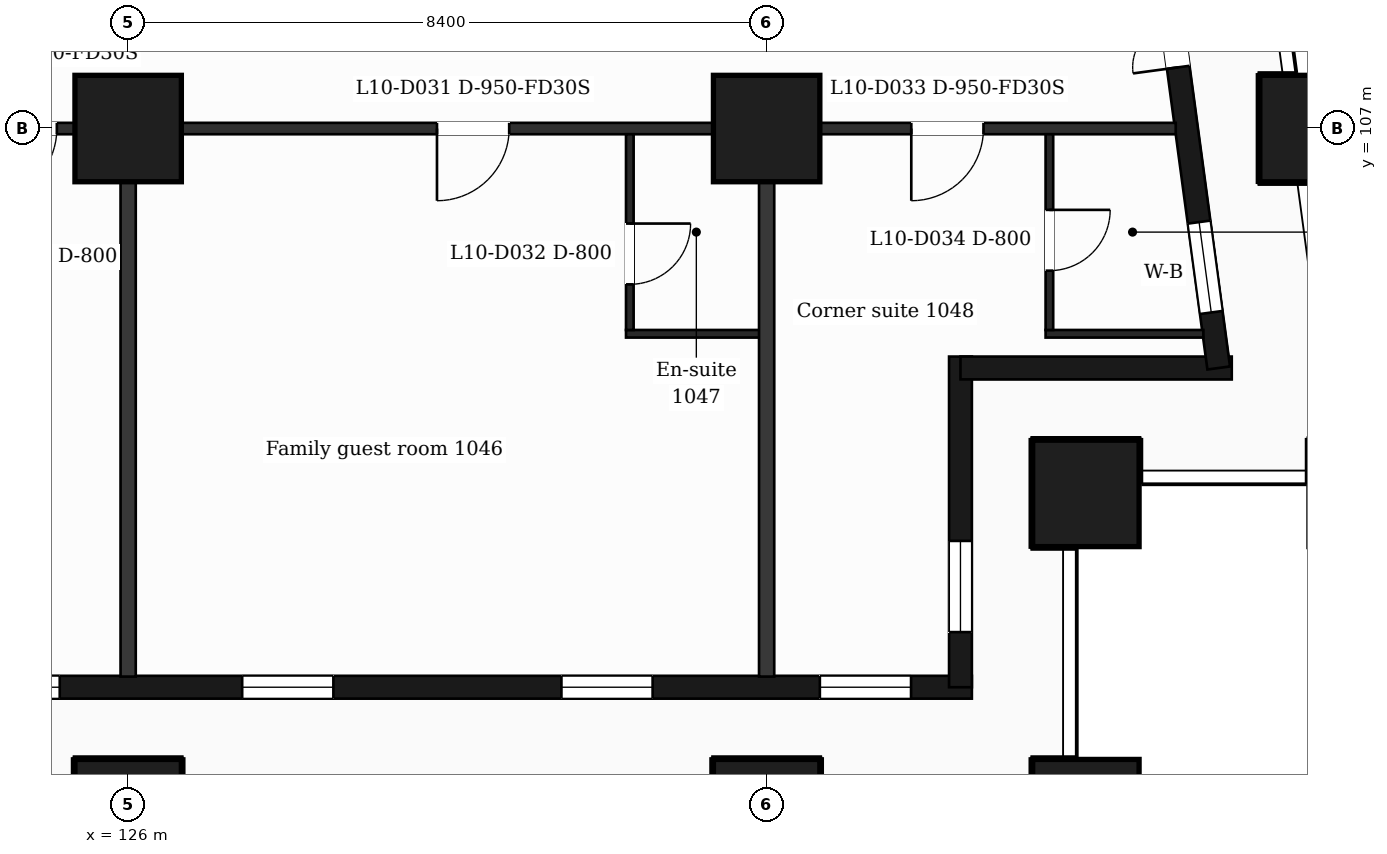
"""IFC4 building model, lengths in metres.
Left out: names, types, materials, properties, quantities, classifications, styles, units other than length and angle.
Written with IfcOpenShell. Run it as: python <this file> out.ifc"""

import sys

from ifc_helpers import new_model, si_unit, direction, frame, frame_2d, origin, origin_2d, place, context, subcontext, project, spatial, rectangle, extrude, element, fill, save


model = new_model("IFC4")
c1 = context("Model", 3, precision=1e-05, world=origin(), true_north=direction((0.0, 1.0)))
c2 = subcontext(c1, "Body", "Model", "MODEL_VIEW")
j1 = project(units=[si_unit("LENGTHUNIT", "METRE"), si_unit("PLANEANGLEUNIT", "RADIAN")], contexts=[c1])
p1 = place(None, origin())
s1 = spatial("IfcSite", under=j1, at=p1, CompositionType="ELEMENT")
p2 = place(p1, origin())
s2 = spatial("IfcBuilding", under=s1, at=p2, CompositionType="ELEMENT")
p3 = place(p2, frame((0.0, 0.0, 53.0)))
s3 = spatial("IfcBuildingStorey", under=s2, at=p3, CompositionType="ELEMENT", Elevation=53.0)
for number, where, z_axis, x_axis in (
    (1, (126.0, 98.0, 0.0), (0.0, 0.0, 1.0), (1.0, 0.0, 0.0)),
    (2, (134.4, 98.0, 0.0), (0.0, 0.0, 1.0), (1.0, 0.0, 0.0)),
    (3, (138.6, 98.0, 0.0), (0.0, 0.0, 1.0), (1.0, 0.0, 0.0)),
    (4, (138.6, 102.2, 0.0), (0.0, 0.0, 1.0), (1.0, 0.0, 0.0)),
    (5, (126.0, 107.0, 0.0), (0.0, 0.0, 1.0), (1.0, 0.0, 0.0)),
    (6, (134.4, 107.0, 0.0), (0.0, 0.0, 1.0), (1.0, 0.0, 0.0)),
    (7, (141.588, 107.0, 0.0), (0.0, 0.0, 1.0), (1.0, 0.0, 0.0)),
):
    element("IfcColumn", number, at=place(p3, frame(where, z_axis=z_axis, x_axis=x_axis)), inside=s3, PredefinedType="COLUMN", context=c2, shape_type="SweptSolid", body=[
        extrude(rectangle(XDim=1.4, YDim=1.4, at=origin_2d()), origin(), (0.0, 0.0, 1.0), 3.5),
    ])
p4 = place(p3, frame((89.85, 99.65, 0.0), z_axis=(0.0, 0.0, 1.0), x_axis=(1.0, 0.0, 0.0)))
e8 = element("IfcWall", 8, at=p4, inside=s3, PredefinedType="SOLIDWALL", context=c2, shape_type="SweptSolid", body=[
    extrude(rectangle(XDim=47.25, YDim=0.3, at=frame_2d((23.625, 0.0))), origin(), (0.0, 0.0, 1.0), 3.18),
])
p5 = place(p4, frame((0.725, 0.0, 0.9)))
e9 = element("IfcOpeningElement", 9, at=p5, cuts=e8, PredefinedType="OPENING", context=c2, shape_type="SweptSolid", body=[
    extrude(rectangle(XDim=1.2, YDim=2.1, at=frame_2d((0.6, 1.05))), frame((0.0, 0.16, 0.0), z_axis=(0.0, -1.0, 0.0), x_axis=(1.0, 0.0, 0.0)), (0.0, 0.0, 1.0), 0.32),
])
p6 = place(p4, frame((3.45, 0.0, 0.9)))
e10 = element("IfcOpeningElement", 10, at=p6, cuts=e8, PredefinedType="OPENING", context=c2, shape_type="SweptSolid", body=[
    extrude(rectangle(XDim=2.4, YDim=2.1, at=frame_2d((1.2, 1.05))), frame((0.0, 0.16, 0.0), z_axis=(0.0, -1.0, 0.0), x_axis=(1.0, 0.0, 0.0)), (0.0, 0.0, 1.0), 0.32),
])
p7 = place(p4, frame((8.25, 0.0, 0.9)))
e11 = element("IfcOpeningElement", 11, at=p7, cuts=e8, PredefinedType="OPENING", context=c2, shape_type="SweptSolid", body=[
    extrude(rectangle(XDim=1.2, YDim=2.1, at=frame_2d((0.6, 1.05))), frame((0.0, 0.16, 0.0), z_axis=(0.0, -1.0, 0.0), x_axis=(1.0, 0.0, 0.0)), (0.0, 0.0, 1.0), 0.32),
])
p8 = place(p4, frame((12.45, 0.0, 0.9)))
e12 = element("IfcOpeningElement", 12, at=p8, cuts=e8, PredefinedType="OPENING", context=c2, shape_type="SweptSolid", body=[
    extrude(rectangle(XDim=1.2, YDim=2.1, at=frame_2d((0.6, 1.05))), frame((0.0, 0.16, 0.0), z_axis=(0.0, -1.0, 0.0), x_axis=(1.0, 0.0, 0.0)), (0.0, 0.0, 1.0), 0.32),
])
p9 = place(p4, frame((16.05, 0.0, 0.9)))
e13 = element("IfcOpeningElement", 13, at=p9, cuts=e8, PredefinedType="OPENING", context=c2, shape_type="SweptSolid", body=[
    extrude(rectangle(XDim=2.4, YDim=2.1, at=frame_2d((1.2, 1.05))), frame((0.0, 0.16, 0.0), z_axis=(0.0, -1.0, 0.0), x_axis=(1.0, 0.0, 0.0)), (0.0, 0.0, 1.0), 0.32),
])
p10 = place(p4, frame((20.25, 0.0, 0.9)))
e14 = element("IfcOpeningElement", 14, at=p10, cuts=e8, PredefinedType="OPENING", context=c2, shape_type="SweptSolid", body=[
    extrude(rectangle(XDim=2.4, YDim=2.1, at=frame_2d((1.2, 1.05))), frame((0.0, 0.16, 0.0), z_axis=(0.0, -1.0, 0.0), x_axis=(1.0, 0.0, 0.0)), (0.0, 0.0, 1.0), 0.32),
])
p11 = place(p4, frame((25.05, 0.0, 0.0)))
e15 = element("IfcOpeningElement", 15, at=p11, cuts=e8, PredefinedType="OPENING", context=c2, shape_type="SweptSolid", body=[
    extrude(rectangle(XDim=1.2, YDim=2.4, at=frame_2d((0.6, 1.2))), frame((0.0, 0.16, 0.0), z_axis=(0.0, -1.0, 0.0), x_axis=(1.0, 0.0, 0.0)), (0.0, 0.0, 1.0), 0.32),
])
p12 = place(p4, frame((28.65, 0.0, 0.9)))
e16 = element("IfcOpeningElement", 16, at=p12, cuts=e8, PredefinedType="OPENING", context=c2, shape_type="SweptSolid", body=[
    extrude(rectangle(XDim=2.4, YDim=2.1, at=frame_2d((1.2, 1.05))), frame((0.0, 0.16, 0.0), z_axis=(0.0, -1.0, 0.0), x_axis=(1.0, 0.0, 0.0)), (0.0, 0.0, 1.0), 0.32),
])
p13 = place(p4, frame((32.85, 0.0, 0.9)))
e17 = element("IfcOpeningElement", 17, at=p13, cuts=e8, PredefinedType="OPENING", context=c2, shape_type="SweptSolid", body=[
    extrude(rectangle(XDim=2.4, YDim=2.1, at=frame_2d((1.2, 1.05))), frame((0.0, 0.16, 0.0), z_axis=(0.0, -1.0, 0.0), x_axis=(1.0, 0.0, 0.0)), (0.0, 0.0, 1.0), 0.32),
])
p14 = place(p4, frame((37.65, 0.0, 0.9)))
e18 = element("IfcOpeningElement", 18, at=p14, cuts=e8, PredefinedType="OPENING", context=c2, shape_type="SweptSolid", body=[
    extrude(rectangle(XDim=1.2, YDim=2.1, at=frame_2d((0.6, 1.05))), frame((0.0, 0.16, 0.0), z_axis=(0.0, -1.0, 0.0), x_axis=(1.0, 0.0, 0.0)), (0.0, 0.0, 1.0), 0.32),
])
p15 = place(p4, frame((41.85, 0.0, 0.9)))
e19 = element("IfcOpeningElement", 19, at=p15, cuts=e8, PredefinedType="OPENING", context=c2, shape_type="SweptSolid", body=[
    extrude(rectangle(XDim=1.2, YDim=2.1, at=frame_2d((0.6, 1.05))), frame((0.0, 0.16, 0.0), z_axis=(0.0, -1.0, 0.0), x_axis=(1.0, 0.0, 0.0)), (0.0, 0.0, 1.0), 0.32),
])
p16 = place(p4, frame((45.25, 0.0, 0.9)))
e20 = element("IfcOpeningElement", 20, at=p16, cuts=e8, PredefinedType="OPENING", context=c2, shape_type="SweptSolid", body=[
    extrude(rectangle(XDim=1.2, YDim=2.1, at=frame_2d((0.6, 1.05))), frame((0.0, 0.16, 0.0), z_axis=(0.0, -1.0, 0.0), x_axis=(1.0, 0.0, 0.0)), (0.0, 0.0, 1.0), 0.32),
])
p17 = place(p3, frame((136.95, 99.65, 0.0), z_axis=(0.0, 0.0, 1.0), x_axis=(0.0, 1.0, 0.0)))
e21 = element("IfcWall", 21, at=p17, inside=s3, PredefinedType="SOLIDWALL", context=c2, shape_type="SweptSolid", body=[
    extrude(rectangle(XDim=4.35, YDim=0.3, at=frame_2d((2.175, 0.0))), origin(), (0.0, 0.0, 1.0), 3.18),
])
p18 = place(p17, frame((0.725, 0.0, 0.9)))
e22 = element("IfcOpeningElement", 22, at=p18, cuts=e21, PredefinedType="OPENING", context=c2, shape_type="SweptSolid", body=[
    extrude(rectangle(XDim=1.2, YDim=2.1, at=frame_2d((0.6, 1.05))), frame((0.0, 0.16, 0.0), z_axis=(0.0, -1.0, 0.0), x_axis=(1.0, 0.0, 0.0)), (0.0, 0.0, 1.0), 0.32),
])
p19 = place(p3, frame((136.95, 103.85, 0.0), z_axis=(0.0, 0.0, 1.0), x_axis=(1.0, 0.0, 0.0)))
e23 = element("IfcWall", 23, at=p19, inside=s3, PredefinedType="SOLIDWALL", context=c2, shape_type="SweptSolid", body=[
    extrude(rectangle(XDim=3.569, YDim=0.3, at=frame_2d((1.785, 0.0))), origin(), (0.0, 0.0, 1.0), 3.18),
])
p20 = place(p3, frame((140.348, 103.85, 0.0), z_axis=(0.0, 0.0, 1.0), x_axis=(-0.133431549479, 0.991058031401, 0.0)))
e24 = element("IfcWall", 24, at=p20, inside=s3, PredefinedType="SOLIDWALL", context=c2, shape_type="SweptSolid", body=[
    extrude(rectangle(XDim=6.609, YDim=0.3, at=frame_2d((3.304, 0.0))), origin(), (0.0, 0.0, 1.0), 3.18),
])
p21 = place(p20, frame((0.737, 0.0, 0.9)))
e25 = element("IfcOpeningElement", 25, at=p21, cuts=e24, PredefinedType="OPENING", context=c2, shape_type="SweptSolid", body=[
    extrude(rectangle(XDim=1.2, YDim=2.1, at=frame_2d((0.6, 1.05))), frame((0.0, 0.16, 0.0), z_axis=(0.0, -1.0, 0.0), x_axis=(1.0, 0.0, 0.0)), (0.0, 0.0, 1.0), 0.32),
])
p22 = place(p20, frame((3.991, 0.0, 0.0)))
e26 = element("IfcOpeningElement", 26, at=p22, cuts=e24, PredefinedType="OPENING", context=c2, shape_type="SweptSolid", body=[
    extrude(rectangle(XDim=1.2, YDim=2.4, at=frame_2d((0.6, 1.2))), frame((0.0, 0.16, 0.0), z_axis=(0.0, -1.0, 0.0), x_axis=(1.0, 0.0, 0.0)), (0.0, 0.0, 1.0), 0.32),
])
p23 = place(p3, frame((132.55, 104.3, 0.0), z_axis=(0.0, 0.0, 1.0), x_axis=(1.0, 0.0, 0.0)))
e27 = element("IfcWall", 27, at=p23, inside=s3, PredefinedType="PARTITIONING", context=c2, shape_type="SweptSolid", body=[
    extrude(rectangle(XDim=1.85, YDim=0.1, at=frame_2d((0.925, 0.0))), origin(), (0.0, 0.0, 1.0), 3.18),
])
p24 = place(p3, frame((138.07, 104.3, 0.0), z_axis=(0.0, 0.0, 1.0), x_axis=(1.0, 0.0, 0.0)))
e28 = element("IfcWall", 28, at=p24, inside=s3, PredefinedType="PARTITIONING", context=c2, shape_type="SweptSolid", body=[
    extrude(rectangle(XDim=2.076, YDim=0.1, at=frame_2d((1.038, 0.0))), origin(), (0.0, 0.0, 1.0), 3.18),
])
p25 = place(p3, frame((87.018, 107.0, 0.0), z_axis=(0.0, 0.0, 1.0), x_axis=(1.0, 0.0, 0.0)))
e29 = element("IfcWall", 29, at=p25, inside=s3, PredefinedType="PARTITIONING", context=c2, shape_type="SweptSolid", body=[
    extrude(rectangle(XDim=52.765, YDim=0.15, at=frame_2d((26.382, 0.0))), origin(), (0.0, 0.0, 1.0), 3.18),
])
p26 = place(p25, frame((0.87, 0.0, 0.0)))
e30 = element("IfcOpeningElement", 30, at=p26, cuts=e29, PredefinedType="OPENING", context=c2, shape_type="SweptSolid", body=[
    extrude(rectangle(XDim=0.95, YDim=2.1, at=frame_2d((0.475, 1.05))), frame((0.0, 0.085, 0.0), z_axis=(0.0, -1.0, 0.0), x_axis=(1.0, 0.0, 0.0)), (0.0, 0.0, 1.0), 0.17),
])
p27 = place(p25, frame((6.752, 0.0, 0.0)))
e31 = element("IfcOpeningElement", 31, at=p27, cuts=e29, PredefinedType="OPENING", context=c2, shape_type="SweptSolid", body=[
    extrude(rectangle(XDim=0.95, YDim=2.1, at=frame_2d((0.475, 1.05))), frame((0.0, 0.085, 0.0), z_axis=(0.0, -1.0, 0.0), x_axis=(1.0, 0.0, 0.0)), (0.0, 0.0, 1.0), 0.17),
])
p28 = place(p25, frame((9.857, 0.0, 0.0)))
e32 = element("IfcOpeningElement", 32, at=p28, cuts=e29, PredefinedType="OPENING", context=c2, shape_type="SweptSolid", body=[
    extrude(rectangle(XDim=0.95, YDim=2.1, at=frame_2d((0.475, 1.05))), frame((0.0, 0.085, 0.0), z_axis=(0.0, -1.0, 0.0), x_axis=(1.0, 0.0, 0.0)), (0.0, 0.0, 1.0), 0.17),
])
p29 = place(p25, frame((14.682, 0.0, 0.0)))
e33 = element("IfcOpeningElement", 33, at=p29, cuts=e29, PredefinedType="OPENING", context=c2, shape_type="SweptSolid", body=[
    extrude(rectangle(XDim=0.95, YDim=2.1, at=frame_2d((0.475, 1.05))), frame((0.0, 0.085, 0.0), z_axis=(0.0, -1.0, 0.0), x_axis=(1.0, 0.0, 0.0)), (0.0, 0.0, 1.0), 0.17),
])
p30 = place(p25, frame((19.862, 0.0, 0.0)))
e34 = element("IfcOpeningElement", 34, at=p30, cuts=e29, PredefinedType="OPENING", context=c2, shape_type="SweptSolid", body=[
    extrude(rectangle(XDim=0.95, YDim=2.1, at=frame_2d((0.475, 1.05))), frame((0.0, 0.085, 0.0), z_axis=(0.0, -1.0, 0.0), x_axis=(1.0, 0.0, 0.0)), (0.0, 0.0, 1.0), 0.17),
])
p31 = place(p25, frame((25.157, 0.0, 0.0)))
e35 = element("IfcOpeningElement", 35, at=p31, cuts=e29, PredefinedType="OPENING", context=c2, shape_type="SweptSolid", body=[
    extrude(rectangle(XDim=0.95, YDim=2.1, at=frame_2d((0.475, 1.05))), frame((0.0, 0.085, 0.0), z_axis=(0.0, -1.0, 0.0), x_axis=(1.0, 0.0, 0.0)), (0.0, 0.0, 1.0), 0.17),
])
p32 = place(p25, frame((28.262, 0.0, 0.0)))
e36 = element("IfcOpeningElement", 36, at=p32, cuts=e29, PredefinedType="OPENING", context=c2, shape_type="SweptSolid", body=[
    extrude(rectangle(XDim=0.95, YDim=2.1, at=frame_2d((0.475, 1.05))), frame((0.0, 0.085, 0.0), z_axis=(0.0, -1.0, 0.0), x_axis=(1.0, 0.0, 0.0)), (0.0, 0.0, 1.0), 0.17),
])
p33 = place(p25, frame((32.207, 0.0, 0.0)))
e37 = element("IfcOpeningElement", 37, at=p33, cuts=e29, PredefinedType="OPENING", context=c2, shape_type="SweptSolid", body=[
    extrude(rectangle(XDim=0.95, YDim=2.1, at=frame_2d((0.475, 1.05))), frame((0.0, 0.085, 0.0), z_axis=(0.0, -1.0, 0.0), x_axis=(1.0, 0.0, 0.0)), (0.0, 0.0, 1.0), 0.17),
])
p34 = place(p25, frame((37.094, 0.0, 0.0)))
e38 = element("IfcOpeningElement", 38, at=p34, cuts=e29, PredefinedType="OPENING", context=c2, shape_type="SweptSolid", body=[
    extrude(rectangle(XDim=0.95, YDim=2.1, at=frame_2d((0.475, 1.05))), frame((0.0, 0.085, 0.0), z_axis=(0.0, -1.0, 0.0), x_axis=(1.0, 0.0, 0.0)), (0.0, 0.0, 1.0), 0.17),
])
p35 = place(p25, frame((43.045, 0.0, 0.0)))
e39 = element("IfcOpeningElement", 39, at=p35, cuts=e29, PredefinedType="OPENING", context=c2, shape_type="SweptSolid", body=[
    extrude(rectangle(XDim=0.95, YDim=2.1, at=frame_2d((0.475, 1.05))), frame((0.0, 0.085, 0.0), z_axis=(0.0, -1.0, 0.0), x_axis=(1.0, 0.0, 0.0)), (0.0, 0.0, 1.0), 0.17),
])
p36 = place(p25, frame((49.285, 0.0, 0.0)))
e40 = element("IfcOpeningElement", 40, at=p36, cuts=e29, PredefinedType="OPENING", context=c2, shape_type="SweptSolid", body=[
    extrude(rectangle(XDim=0.95, YDim=2.1, at=frame_2d((0.475, 1.05))), frame((0.0, 0.085, 0.0), z_axis=(0.0, -1.0, 0.0), x_axis=(1.0, 0.0, 0.0)), (0.0, 0.0, 1.0), 0.17),
])
p37 = place(p3, frame((126.0, 99.79, 0.0), z_axis=(0.0, 0.0, 1.0), x_axis=(0.0, 1.0, 0.0)))
e41 = element("IfcWall", 41, at=p37, inside=s3, PredefinedType="PARTITIONING", context=c2, shape_type="SweptSolid", body=[
    extrude(rectangle(XDim=7.135, YDim=0.2, at=frame_2d((3.567, 0.0))), origin(), (0.0, 0.0, 1.0), 3.18),
])
p38 = place(p3, frame((132.6, 104.35, 0.0), z_axis=(0.0, 0.0, 1.0), x_axis=(0.0, 1.0, 0.0)))
e42 = element("IfcWall", 42, at=p38, inside=s3, PredefinedType="PARTITIONING", context=c2, shape_type="SweptSolid", body=[
    extrude(rectangle(XDim=2.575, YDim=0.1, at=frame_2d((1.288, 0.0))), origin(), (0.0, 0.0, 1.0), 3.18),
])
p39 = place(p38, frame((0.6, 0.0, 0.0)))
e43 = element("IfcOpeningElement", 43, at=p39, cuts=e42, PredefinedType="OPENING", context=c2, shape_type="SweptSolid", body=[
    extrude(rectangle(XDim=0.8, YDim=2.1, at=frame_2d((0.4, 1.05))), frame((0.0, 0.06, 0.0), z_axis=(0.0, -1.0, 0.0), x_axis=(1.0, 0.0, 0.0)), (0.0, 0.0, 1.0), 0.12),
])
p40 = place(p3, frame((134.4, 99.79, 0.0), z_axis=(0.0, 0.0, 1.0), x_axis=(0.0, 1.0, 0.0)))
e44 = element("IfcWall", 44, at=p40, inside=s3, PredefinedType="PARTITIONING", context=c2, shape_type="SweptSolid", body=[
    extrude(rectangle(XDim=7.135, YDim=0.2, at=frame_2d((3.567, 0.0))), origin(), (0.0, 0.0, 1.0), 3.18),
])
p41 = place(p3, frame((138.12, 104.35, 0.0), z_axis=(0.0, 0.0, 1.0), x_axis=(0.0, 1.0, 0.0)))
e45 = element("IfcWall", 45, at=p41, inside=s3, PredefinedType="PARTITIONING", context=c2, shape_type="SweptSolid", body=[
    extrude(rectangle(XDim=2.575, YDim=0.1, at=frame_2d((1.288, 0.0))), origin(), (0.0, 0.0, 1.0), 3.18),
])
p42 = place(p41, frame((0.78, 0.0, 0.0)))
e46 = element("IfcOpeningElement", 46, at=p42, cuts=e45, PredefinedType="OPENING", context=c2, shape_type="SweptSolid", body=[
    extrude(rectangle(XDim=0.8, YDim=2.1, at=frame_2d((0.4, 1.05))), frame((0.0, 0.06, 0.0), z_axis=(0.0, -1.0, 0.0), x_axis=(1.0, 0.0, 0.0)), (0.0, 0.0, 1.0), 0.12),
])
p43 = place(p13, origin())
e47 = element("IfcWindow", 47, at=p43, inside=s3, PartitioningType="SINGLE_PANEL", PredefinedType="WINDOW", context=c2, shape_type="SweptSolid", body=[
    extrude(rectangle(XDim=2.4, YDim=2.1, at=frame_2d((1.2, 1.05))), frame((0.0, 0.03, 0.0), z_axis=(0.0, -1.0, 0.0), x_axis=(1.0, 0.0, 0.0)), (0.0, 0.0, 1.0), 0.06),
])
fill(e17, e47)
p44 = place(p14, origin())
e48 = element("IfcWindow", 48, at=p44, inside=s3, PartitioningType="SINGLE_PANEL", PredefinedType="WINDOW", context=c2, shape_type="SweptSolid", body=[
    extrude(rectangle(XDim=1.2, YDim=2.1, at=frame_2d((0.6, 1.05))), frame((0.0, 0.03, 0.0), z_axis=(0.0, -1.0, 0.0), x_axis=(1.0, 0.0, 0.0)), (0.0, 0.0, 1.0), 0.06),
])
fill(e18, e48)
p45 = place(p15, origin())
e49 = element("IfcWindow", 49, at=p45, inside=s3, PartitioningType="SINGLE_PANEL", PredefinedType="WINDOW", context=c2, shape_type="SweptSolid", body=[
    extrude(rectangle(XDim=1.2, YDim=2.1, at=frame_2d((0.6, 1.05))), frame((0.0, 0.03, 0.0), z_axis=(0.0, -1.0, 0.0), x_axis=(1.0, 0.0, 0.0)), (0.0, 0.0, 1.0), 0.06),
])
fill(e19, e49)
p46 = place(p16, origin())
e50 = element("IfcWindow", 50, at=p46, inside=s3, PartitioningType="SINGLE_PANEL", PredefinedType="WINDOW", context=c2, shape_type="SweptSolid", body=[
    extrude(rectangle(XDim=1.2, YDim=2.1, at=frame_2d((0.6, 1.05))), frame((0.0, 0.03, 0.0), z_axis=(0.0, -1.0, 0.0), x_axis=(1.0, 0.0, 0.0)), (0.0, 0.0, 1.0), 0.06),
])
fill(e20, e50)
p47 = place(p18, origin())
e51 = element("IfcWindow", 51, at=p47, inside=s3, PartitioningType="SINGLE_PANEL", PredefinedType="WINDOW", context=c2, shape_type="SweptSolid", body=[
    extrude(rectangle(XDim=1.2, YDim=2.1, at=frame_2d((0.6, 1.05))), frame((0.0, 0.03, 0.0), z_axis=(0.0, -1.0, 0.0), x_axis=(1.0, 0.0, 0.0)), (0.0, 0.0, 1.0), 0.06),
])
fill(e22, e51)
p48 = place(p21, origin())
e52 = element("IfcWindow", 52, at=p48, inside=s3, PartitioningType="SINGLE_PANEL", PredefinedType="WINDOW", context=c2, shape_type="SweptSolid", body=[
    extrude(rectangle(XDim=1.2, YDim=2.1, at=frame_2d((0.6, 1.05))), frame((0.0, 0.03, 0.0), z_axis=(0.0, -1.0, 0.0), x_axis=(1.0, 0.0, 0.0)), (0.0, 0.0, 1.0), 0.06),
])
fill(e25, e52)
p49 = place(p22, origin())
e53 = element("IfcDoor", 53, at=p49, inside=s3, OperationType="DOUBLE_DOOR_SINGLE_SWING", PredefinedType="DOOR", context=c2, shape_type="SweptSolid", body=[
    extrude(rectangle(XDim=1.2, YDim=2.4, at=frame_2d((0.6, 1.2))), frame((0.0, 0.025, 0.0), z_axis=(0.0, -1.0, 0.0), x_axis=(1.0, 0.0, 0.0)), (0.0, 0.0, 1.0), 0.05),
])
fill(e26, e53)
p50 = place(p34, origin())
e54 = element("IfcDoor", 54, at=p50, inside=s3, OperationType="SINGLE_SWING_LEFT", PredefinedType="DOOR", context=c2, shape_type="SweptSolid", body=[
    extrude(rectangle(XDim=0.95, YDim=2.1, at=frame_2d((0.475, 1.05))), frame((0.0, 0.025, 0.0), z_axis=(0.0, -1.0, 0.0), x_axis=(1.0, 0.0, 0.0)), (0.0, 0.0, 1.0), 0.05),
])
fill(e38, e54)
p51 = place(p35, origin())
e55 = element("IfcDoor", 55, at=p51, inside=s3, OperationType="SINGLE_SWING_LEFT", PredefinedType="DOOR", context=c2, shape_type="SweptSolid", body=[
    extrude(rectangle(XDim=0.95, YDim=2.1, at=frame_2d((0.475, 1.05))), frame((0.0, 0.025, 0.0), z_axis=(0.0, -1.0, 0.0), x_axis=(1.0, 0.0, 0.0)), (0.0, 0.0, 1.0), 0.05),
])
fill(e39, e55)
p52 = place(p39, origin())
e56 = element("IfcDoor", 56, at=p52, inside=s3, OperationType="SINGLE_SWING_RIGHT", PredefinedType="DOOR", context=c2, shape_type="SweptSolid", body=[
    extrude(rectangle(XDim=0.8, YDim=2.1, at=frame_2d((0.4, 1.05))), frame((0.0, 0.025, 0.0), z_axis=(0.0, -1.0, 0.0), x_axis=(1.0, 0.0, 0.0)), (0.0, 0.0, 1.0), 0.05),
])
fill(e43, e56)
p53 = place(p36, origin())
e57 = element("IfcDoor", 57, at=p53, inside=s3, OperationType="SINGLE_SWING_LEFT", PredefinedType="DOOR", context=c2, shape_type="SweptSolid", body=[
    extrude(rectangle(XDim=0.95, YDim=2.1, at=frame_2d((0.475, 1.05))), frame((0.0, 0.025, 0.0), z_axis=(0.0, -1.0, 0.0), x_axis=(1.0, 0.0, 0.0)), (0.0, 0.0, 1.0), 0.05),
])
fill(e40, e57)
p54 = place(p42, origin())
e58 = element("IfcDoor", 58, at=p54, inside=s3, OperationType="SINGLE_SWING_RIGHT", PredefinedType="DOOR", context=c2, shape_type="SweptSolid", body=[
    extrude(rectangle(XDim=0.8, YDim=2.1, at=frame_2d((0.4, 1.05))), frame((0.0, 0.025, 0.0), z_axis=(0.0, -1.0, 0.0), x_axis=(1.0, 0.0, 0.0)), (0.0, 0.0, 1.0), 0.05),
])
fill(e46, e58)
save(model, sys.argv[1])
